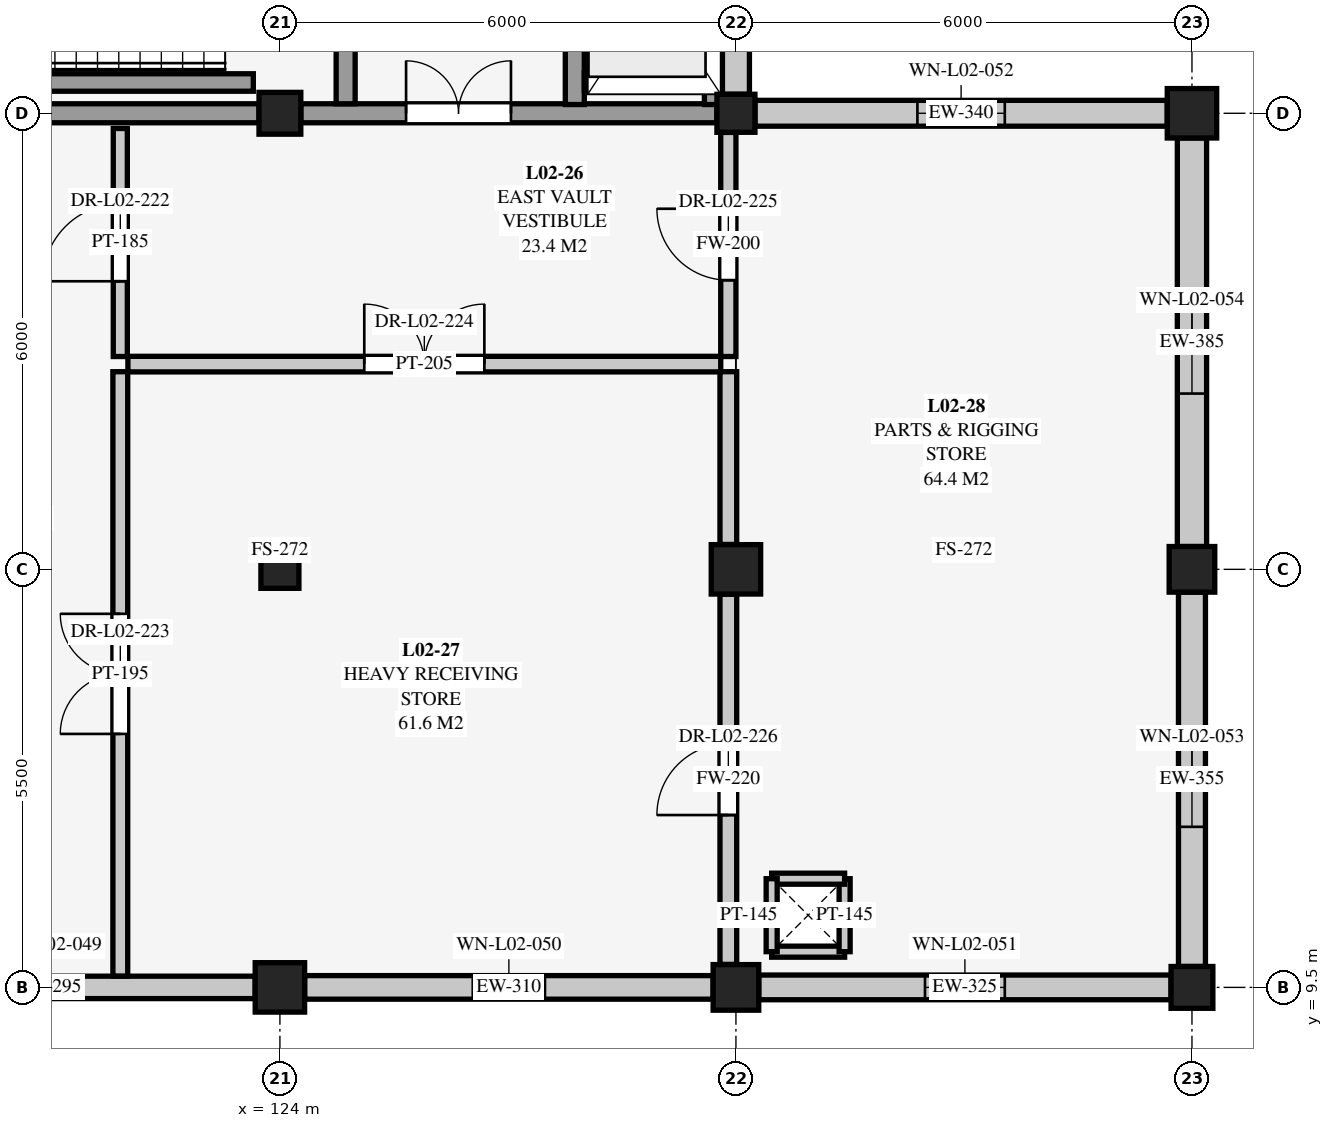
"""IFC4 building model, lengths in metres.
Left out: names, types, materials, properties, quantities, classifications, styles, units other than length and angle.
Written with IfcOpenShell. Run it as: python <this file> out.ifc"""

import sys

from ifc_helpers import new_model, si_unit, direction, frame, frame_2d, origin, origin_2d, place, context, subcontext, project, spatial, rectangle, extrude, element, fill, save


model = new_model("IFC4")
c1 = context("Model", 3, precision=1e-05, world=origin(), true_north=direction((0.0, 1.0)))
c2 = subcontext(c1, "Body", "Model", "MODEL_VIEW")
j1 = project(units=[si_unit("LENGTHUNIT", "METRE"), si_unit("PLANEANGLEUNIT", "RADIAN")], contexts=[c1])
p1 = place(None, origin())
s1 = spatial("IfcSite", under=j1, at=p1, CompositionType="ELEMENT")
p2 = place(p1, origin())
s2 = spatial("IfcBuilding", under=s1, at=p2, CompositionType="ELEMENT")
p3 = place(p2, frame((0.0, 0.0, 4.5)))
s3 = spatial("IfcBuildingStorey", under=s2, at=p3, CompositionType="ELEMENT", Elevation=4.5)
p4 = place(p3, frame((124.0, 9.5, 0.0), z_axis=(0.0, 0.0, 1.0), x_axis=(1.0, 0.0, 0.0)))
e1 = element("IfcColumn", 1, at=p4, inside=s3, PredefinedType="COLUMN", context=c2, shape_type="SweptSolid", body=[
    extrude(rectangle(XDim=0.65, YDim=0.65, at=origin_2d()), origin(), (0.0, 0.0, 1.0), 4.5),
])
p5 = place(p3, frame((124.0, 15.0, 0.0), z_axis=(0.0, 0.0, 1.0), x_axis=(1.0, 0.0, 0.0)))
e2 = element("IfcColumn", 2, at=p5, inside=s3, PredefinedType="COLUMN", context=c2, shape_type="SweptSolid", body=[
    extrude(rectangle(XDim=0.5, YDim=0.5, at=origin_2d()), origin(), (0.0, 0.0, 1.0), 4.5),
])
p6 = place(p3, frame((124.0, 21.0, 0.0), z_axis=(0.0, 0.0, 1.0), x_axis=(1.0, 0.0, 0.0)))
e3 = element("IfcColumn", 3, at=p6, inside=s3, PredefinedType="COLUMN", context=c2, shape_type="SweptSolid", body=[
    extrude(rectangle(XDim=0.55, YDim=0.55, at=origin_2d()), origin(), (0.0, 0.0, 1.0), 4.5),
])
p7 = place(p3, frame((130.0, 9.5, 0.0), z_axis=(0.0, 0.0, 1.0), x_axis=(1.0, 0.0, 0.0)))
e4 = element("IfcColumn", 4, at=p7, inside=s3, PredefinedType="COLUMN", context=c2, shape_type="SweptSolid", body=[
    extrude(rectangle(XDim=0.6, YDim=0.6, at=origin_2d()), origin(), (0.0, 0.0, 1.0), 4.5),
])
p8 = place(p3, frame((130.0, 15.0, 0.0), z_axis=(0.0, 0.0, 1.0), x_axis=(1.0, 0.0, 0.0)))
e5 = element("IfcColumn", 5, at=p8, inside=s3, PredefinedType="COLUMN", context=c2, shape_type="SweptSolid", body=[
    extrude(rectangle(XDim=0.65, YDim=0.65, at=origin_2d()), origin(), (0.0, 0.0, 1.0), 4.5),
])
p9 = place(p3, frame((130.0, 21.0, 0.0), z_axis=(0.0, 0.0, 1.0), x_axis=(1.0, 0.0, 0.0)))
e6 = element("IfcColumn", 6, at=p9, inside=s3, PredefinedType="COLUMN", context=c2, shape_type="SweptSolid", body=[
    extrude(rectangle(XDim=0.5, YDim=0.5, at=origin_2d()), origin(), (0.0, 0.0, 1.0), 4.5),
])
p10 = place(p3, frame((136.0, 9.5, 0.0), z_axis=(0.0, 0.0, 1.0), x_axis=(1.0, 0.0, 0.0)))
e7 = element("IfcColumn", 7, at=p10, inside=s3, PredefinedType="COLUMN", context=c2, shape_type="SweptSolid", body=[
    extrude(rectangle(XDim=0.55, YDim=0.55, at=origin_2d()), origin(), (0.0, 0.0, 1.0), 4.5),
])
p11 = place(p3, frame((136.0, 15.0, 0.0), z_axis=(0.0, 0.0, 1.0), x_axis=(1.0, 0.0, 0.0)))
e8 = element("IfcColumn", 8, at=p11, inside=s3, PredefinedType="COLUMN", context=c2, shape_type="SweptSolid", body=[
    extrude(rectangle(XDim=0.6, YDim=0.6, at=origin_2d()), origin(), (0.0, 0.0, 1.0), 4.5),
])
p12 = place(p3, frame((136.0, 21.0, 0.0), z_axis=(0.0, 0.0, 1.0), x_axis=(1.0, 0.0, 0.0)))
e9 = element("IfcColumn", 9, at=p12, inside=s3, PredefinedType="COLUMN", context=c2, shape_type="SweptSolid", body=[
    extrude(rectangle(XDim=0.65, YDim=0.65, at=origin_2d()), origin(), (0.0, 0.0, 1.0), 4.5),
])
p13 = place(p3, frame((123.675, 9.5, 0.0), z_axis=(0.0, 0.0, 1.0), x_axis=(-1.0, 0.0, 0.0)))
e10 = element("IfcWall", 10, at=p13, inside=s3, PredefinedType="SOLIDWALL", context=c2, shape_type="SweptSolid", body=[
    extrude(rectangle(XDim=5.425, YDim=0.295, at=frame_2d((2.712, 0.0))), origin(), (0.0, 0.0, 1.0), 3.809),
])
p14 = place(p13, frame((2.288, 0.0, 0.9)))
e11 = element("IfcOpeningElement", 11, at=p14, cuts=e10, PredefinedType="OPENING", context=c2, shape_type="SweptSolid", body=[
    extrude(rectangle(XDim=0.85, YDim=1.95, at=frame_2d((0.425, 0.975))), frame((0.0, 0.157, 0.0), z_axis=(0.0, -1.0, 0.0), x_axis=(1.0, 0.0, 0.0)), (0.0, 0.0, 1.0), 0.315),
])
p15 = place(p3, frame((129.7, 9.5, 0.0), z_axis=(0.0, 0.0, 1.0), x_axis=(-1.0, 0.0, 0.0)))
e12 = element("IfcWall", 12, at=p15, inside=s3, PredefinedType="SOLIDWALL", context=c2, shape_type="SweptSolid", body=[
    extrude(rectangle(XDim=5.375, YDim=0.31, at=frame_2d((2.688, 0.0))), origin(), (0.0, 0.0, 1.0), 3.809),
])
p16 = place(p15, frame((2.212, 0.0, 0.9)))
e13 = element("IfcOpeningElement", 13, at=p16, cuts=e12, PredefinedType="OPENING", context=c2, shape_type="SweptSolid", body=[
    extrude(rectangle(XDim=0.95, YDim=1.95, at=frame_2d((0.475, 0.975))), frame((0.0, 0.165, 0.0), z_axis=(0.0, -1.0, 0.0), x_axis=(1.0, 0.0, 0.0)), (0.0, 0.0, 1.0), 0.33),
])
p17 = place(p3, frame((135.725, 9.5, 0.0), z_axis=(0.0, 0.0, 1.0), x_axis=(-1.0, 0.0, 0.0)))
e14 = element("IfcWall", 14, at=p17, inside=s3, PredefinedType="SOLIDWALL", context=c2, shape_type="SweptSolid", body=[
    extrude(rectangle(XDim=5.425, YDim=0.325, at=frame_2d((2.712, 0.0))), origin(), (0.0, 0.0, 1.0), 3.809),
])
p18 = place(p17, frame((2.188, 0.0, 0.85)))
e15 = element("IfcOpeningElement", 15, at=p18, cuts=e14, PredefinedType="OPENING", context=c2, shape_type="SweptSolid", body=[
    extrude(rectangle(XDim=1.05, YDim=2.05, at=frame_2d((0.525, 1.025))), frame((0.0, 0.173, 0.0), z_axis=(0.0, -1.0, 0.0), x_axis=(1.0, 0.0, 0.0)), (0.0, 0.0, 1.0), 0.345),
])
p19 = place(p3, frame((130.25, 21.0, 0.0), z_axis=(0.0, 0.0, 1.0), x_axis=(1.0, 0.0, 0.0)))
e16 = element("IfcWall", 16, at=p19, inside=s3, PredefinedType="SOLIDWALL", context=c2, shape_type="SweptSolid", body=[
    extrude(rectangle(XDim=5.425, YDim=0.34, at=frame_2d((2.712, 0.0))), origin(), (0.0, 0.0, 1.0), 3.797),
])
p20 = place(p19, frame((2.137, 0.0, 0.85)))
e17 = element("IfcOpeningElement", 17, at=p20, cuts=e16, PredefinedType="OPENING", context=c2, shape_type="SweptSolid", body=[
    extrude(rectangle(XDim=1.15, YDim=2.05, at=frame_2d((0.575, 1.025))), frame((0.0, 0.18, 0.0), z_axis=(0.0, -1.0, 0.0), x_axis=(1.0, 0.0, 0.0)), (0.0, 0.0, 1.0), 0.36),
])
p21 = place(p3, frame((136.0, 14.7, 0.0), z_axis=(0.0, 0.0, 1.0), x_axis=(0.0, -1.0, 0.0)))
e18 = element("IfcWall", 18, at=p21, inside=s3, PredefinedType="SOLIDWALL", context=c2, shape_type="SweptSolid", body=[
    extrude(rectangle(XDim=4.925, YDim=0.355, at=frame_2d((2.462, 0.0))), origin(), (0.0, 0.0, 1.0), 3.809),
])
p22 = place(p21, frame((1.837, 0.0, 0.8)))
e19 = element("IfcOpeningElement", 19, at=p22, cuts=e18, PredefinedType="OPENING", context=c2, shape_type="SweptSolid", body=[
    extrude(rectangle(XDim=1.25, YDim=2.15, at=frame_2d((0.625, 1.075))), frame((0.0, 0.188, 0.0), z_axis=(0.0, -1.0, 0.0), x_axis=(1.0, 0.0, 0.0)), (0.0, 0.0, 1.0), 0.375),
])
p23 = place(p3, frame((136.0, 20.675, 0.0), z_axis=(0.0, 0.0, 1.0), x_axis=(0.0, -1.0, 0.0)))
e20 = element("IfcWall", 20, at=p23, inside=s3, PredefinedType="SOLIDWALL", context=c2, shape_type="SweptSolid", body=[
    extrude(rectangle(XDim=5.375, YDim=0.385, at=frame_2d((2.688, 0.0))), origin(), (0.0, 0.0, 1.0), 3.809),
])
p24 = place(p23, frame((2.012, 0.0, 0.8)))
e21 = element("IfcOpeningElement", 21, at=p24, cuts=e20, PredefinedType="OPENING", context=c2, shape_type="SweptSolid", body=[
    extrude(rectangle(XDim=1.35, YDim=2.15, at=frame_2d((0.675, 1.075))), frame((0.0, 0.202, 0.0), z_axis=(0.0, -1.0, 0.0), x_axis=(1.0, 0.0, 0.0)), (0.0, 0.0, 1.0), 0.405),
])
p25 = place(p3, frame((130.0, 26.75, 0.0), z_axis=(0.0, 0.0, 1.0), x_axis=(0.0, -1.0, 0.0)))
e22 = element("IfcWall", 22, at=p25, inside=s3, PredefinedType="SOLIDWALL", context=c2, shape_type="SweptSolid", body=[
    extrude(rectangle(XDim=5.5, YDim=0.355, at=frame_2d((2.75, 0.0))), origin(), (0.0, 0.0, 1.0), 3.797),
])
for number, where, z_axis, x_axis in (
    (23, (130.47, 9.97, 0.0), (0.0, 0.0, 1.0), (1.0, 0.0, 0.0)),
    (24, (131.43, 9.97, 0.0), (0.0, 0.0, 1.0), (0.0, 1.0, 0.0)),
    (25, (131.43, 10.93, 0.0), (0.0, 0.0, 1.0), (-1.0, 0.0, 0.0)),
    (26, (130.47, 10.93, 0.0), (0.0, 0.0, 1.0), (0.0, -1.0, 0.0)),
):
    element("IfcWall", number, at=place(p3, frame(where, z_axis=z_axis, x_axis=x_axis)), inside=s3, PredefinedType="PARTITIONING", context=c2, shape_type="SweptSolid", body=[
        extrude(rectangle(XDim=0.96, YDim=0.145, at=frame_2d((0.48, 0.0))), origin(), (0.0, 0.0, 1.0), 4.216),
    ])
p26 = place(p3, frame((118.3, 21.0, 0.0), z_axis=(0.0, 0.0, 1.0), x_axis=(1.0, 0.0, 0.0)))
e27 = element("IfcWall", 27, at=p26, inside=s3, PredefinedType="SHEAR", context=c2, shape_type="SweptSolid", body=[
    extrude(rectangle(XDim=5.425, YDim=0.25, at=frame_2d((2.712, 0.0))), origin(), (0.0, 0.0, 1.0), 4.204),
])
p27 = place(p3, frame((124.275, 21.0, 0.0), z_axis=(0.0, 0.0, 1.0), x_axis=(1.0, 0.0, 0.0)))
e28 = element("IfcWall", 28, at=p27, inside=s3, PredefinedType="SHEAR", context=c2, shape_type="SweptSolid", body=[
    extrude(rectangle(XDim=5.475, YDim=0.25, at=frame_2d((2.738, 0.0))), origin(), (0.0, 0.0, 1.0), 4.204),
])
p28 = place(p27, frame((1.385, 0.0, 0.0)))
e29 = element("IfcOpeningElement", 29, at=p28, cuts=e28, PredefinedType="OPENING", context=c2, shape_type="SweptSolid", body=[
    extrude(rectangle(XDim=1.38, YDim=2.16, at=frame_2d((0.69, 1.08))), frame((0.0, 0.135, 0.0), z_axis=(0.0, -1.0, 0.0), x_axis=(1.0, 0.0, 0.0)), (0.0, 0.0, 1.0), 0.27),
])
p29 = place(p3, frame((118.52, 21.405, 0.0), z_axis=(0.0, 0.0, 1.0), x_axis=(1.0, 0.0, 0.0)))
e30 = element("IfcWall", 30, at=p29, inside=s3, PredefinedType="SHEAR", context=c2, shape_type="SweptSolid", body=[
    extrude(rectangle(XDim=5.13, YDim=0.23, at=frame_2d((2.565, 0.0))), origin(), (0.0, 0.0, 1.0), 4.5),
])
p30 = place(p3, frame((124.865, 21.125, 0.0), z_axis=(0.0, 0.0, 1.0), x_axis=(0.0, 1.0, 0.0)))
e31 = element("IfcWall", 31, at=p30, inside=s3, PredefinedType="SHEAR", context=c2, shape_type="SweptSolid", body=[
    extrude(rectangle(XDim=5.75, YDim=0.25, at=frame_2d((2.875, 0.0))), origin(), (0.0, 0.0, 1.0), 4.204),
])
p31 = place(p30, frame((4.275, 0.0, 0.0)))
e32 = element("IfcOpeningElement", 32, at=p31, cuts=e31, PredefinedType="OPENING", context=c2, shape_type="SweptSolid", body=[
    extrude(rectangle(XDim=1.04, YDim=2.14, at=frame_2d((0.52, 1.07))), frame((0.0, 0.135, 0.0), z_axis=(0.0, -1.0, 0.0), x_axis=(1.0, 0.0, 0.0)), (0.0, 0.0, 1.0), 0.27),
])
p32 = place(p3, frame((127.88, 21.115, 0.0), z_axis=(0.0, 0.0, 1.0), x_axis=(0.0, 1.0, 0.0)))
e33 = element("IfcWall", 33, at=p32, inside=s3, PredefinedType="SHEAR", context=c2, shape_type="SweptSolid", body=[
    extrude(rectangle(XDim=2.965, YDim=0.25, at=frame_2d((1.482, 0.0))), origin(), (0.0, 0.0, 1.0), 4.5),
])
p33 = place(p32, frame((1.095, 0.0, 0.0)))
e34 = element("IfcOpeningElement", 34, at=p33, cuts=e33, PredefinedType="OPENING", context=c2, shape_type="SweptSolid", body=[
    extrude(rectangle(XDim=1.08, YDim=2.15, at=frame_2d((0.54, 1.075))), frame((0.0, 0.135, 0.0), z_axis=(0.0, -1.0, 0.0), x_axis=(1.0, 0.0, 0.0)), (0.0, 0.0, 1.0), 0.27),
])
p34 = place(p3, frame((128.005, 21.42, 0.0), z_axis=(0.0, 0.0, 1.0), x_axis=(1.0, 0.0, 0.0)))
e35 = element("IfcWall", 35, at=p34, inside=s3, PredefinedType="SHEAR", context=c2, shape_type="SweptSolid", body=[
    extrude(rectangle(XDim=1.58, YDim=0.23, at=frame_2d((0.79, 0.0))), origin(), (0.0, 0.0, 1.0), 4.5),
])
p35 = place(p3, frame((129.7, 21.115, 0.0), z_axis=(0.0, 0.0, 1.0), x_axis=(0.0, 1.0, 0.0)))
e36 = element("IfcWall", 36, at=p35, inside=s3, PredefinedType="SHEAR", context=c2, shape_type="SweptSolid", body=[
    extrude(rectangle(XDim=2.965, YDim=0.23, at=frame_2d((1.482, 0.0))), origin(), (0.0, 0.0, 1.0), 4.5),
])
p36 = place(p3, frame((121.9, 17.8, 0.0), z_axis=(0.0, 0.0, 1.0), x_axis=(0.0, 1.0, 0.0)))
e37 = element("IfcWall", 37, at=p36, inside=s3, PredefinedType="PARTITIONING", context=c2, shape_type="SweptSolid", body=[
    extrude(rectangle(XDim=3.0, YDim=0.185, at=frame_2d((1.5, 0.0))), origin(), (0.0, 0.0, 1.0), 4.216),
])
p37 = place(p36, frame((0.99, 0.0, 0.0)))
e38 = element("IfcOpeningElement", 38, at=p37, cuts=e37, PredefinedType="OPENING", context=c2, shape_type="SweptSolid", body=[
    extrude(rectangle(XDim=1.02, YDim=2.16, at=frame_2d((0.51, 1.08))), frame((0.0, 0.103, 0.0), z_axis=(0.0, -1.0, 0.0), x_axis=(1.0, 0.0, 0.0)), (0.0, 0.0, 1.0), 0.205),
])
p38 = place(p3, frame((121.9, 9.649, 0.0), z_axis=(0.0, 0.0, 1.0), x_axis=(0.0, 1.0, 0.0)))
e39 = element("IfcWall", 39, at=p38, inside=s3, PredefinedType="PARTITIONING", context=c2, shape_type="SweptSolid", body=[
    extrude(rectangle(XDim=7.951, YDim=0.195, at=frame_2d((3.975, 0.0))), origin(), (0.0, 0.0, 1.0), 4.216),
])
p39 = place(p38, frame((3.185, 0.0, 0.0)))
e40 = element("IfcOpeningElement", 40, at=p39, cuts=e39, PredefinedType="OPENING", context=c2, shape_type="SweptSolid", body=[
    extrude(rectangle(XDim=1.58, YDim=2.2, at=frame_2d((0.79, 1.1))), frame((0.0, 0.108, 0.0), z_axis=(0.0, -1.0, 0.0), x_axis=(1.0, 0.0, 0.0)), (0.0, 0.0, 1.0), 0.215),
])
p40 = place(p3, frame((122.0, 17.7, 0.0), z_axis=(0.0, 0.0, 1.0), x_axis=(1.0, 0.0, 0.0)))
e41 = element("IfcWall", 41, at=p40, inside=s3, PredefinedType="PARTITIONING", context=c2, shape_type="SweptSolid", body=[
    extrude(rectangle(XDim=7.8, YDim=0.205, at=frame_2d((3.9, 0.0))), origin(), (0.0, 0.0, 1.0), 4.216),
])
p41 = place(p40, frame((3.11, 0.0, 0.0)))
e42 = element("IfcOpeningElement", 42, at=p41, cuts=e41, PredefinedType="OPENING", context=c2, shape_type="SweptSolid", body=[
    extrude(rectangle(XDim=1.58, YDim=2.2, at=frame_2d((0.79, 1.1))), frame((0.0, 0.113, 0.0), z_axis=(0.0, -1.0, 0.0), x_axis=(1.0, 0.0, 0.0)), (0.0, 0.0, 1.0), 0.225),
])
p42 = place(p3, frame((129.9, 17.8, 0.0), z_axis=(0.0, 0.0, 1.0), x_axis=(0.0, 1.0, 0.0)))
e43 = element("IfcWall", 43, at=p42, inside=s3, PredefinedType="SOLIDWALL", context=c2, shape_type="SweptSolid", body=[
    extrude(rectangle(XDim=2.948, YDim=0.2, at=frame_2d((1.474, 0.0))), origin(), (0.0, 0.0, 1.0), 3.85),
])
p43 = place(p42, frame((1.004, 0.0, 0.0)))
e44 = element("IfcOpeningElement", 44, at=p43, cuts=e43, PredefinedType="OPENING", context=c2, shape_type="SweptSolid", body=[
    extrude(rectangle(XDim=0.94, YDim=2.1, at=frame_2d((0.47, 1.05))), frame((0.0, 0.11, 0.0), z_axis=(0.0, -1.0, 0.0), x_axis=(1.0, 0.0, 0.0)), (0.0, 0.0, 1.0), 0.22),
])
p44 = place(p3, frame((129.9, 9.802, 0.0), z_axis=(0.0, 0.0, 1.0), x_axis=(0.0, 1.0, 0.0)))
e45 = element("IfcWall", 45, at=p44, inside=s3, PredefinedType="SOLIDWALL", context=c2, shape_type="SweptSolid", body=[
    extrude(rectangle(XDim=4.871, YDim=0.22, at=frame_2d((2.436, 0.0))), origin(), (0.0, 0.0, 1.0), 4.216),
])
p45 = place(p44, frame((1.966, 0.0, 0.0)))
e46 = element("IfcOpeningElement", 46, at=p45, cuts=e45, PredefinedType="OPENING", context=c2, shape_type="SweptSolid", body=[
    extrude(rectangle(XDim=0.94, YDim=2.1, at=frame_2d((0.47, 1.05))), frame((0.0, 0.12, 0.0), z_axis=(0.0, -1.0, 0.0), x_axis=(1.0, 0.0, 0.0)), (0.0, 0.0, 1.0), 0.24),
])
p46 = place(p3, frame((129.9, 15.327, 0.0), z_axis=(0.0, 0.0, 1.0), x_axis=(0.0, 1.0, 0.0)))
e47 = element("IfcWall", 47, at=p46, inside=s3, PredefinedType="SOLIDWALL", context=c2, shape_type="SweptSolid", body=[
    extrude(rectangle(XDim=2.273, YDim=0.22, at=frame_2d((1.137, 0.0))), origin(), (0.0, 0.0, 1.0), 3.85),
])
p47 = place(p14, origin())
e48 = element("IfcWindow", 48, at=p47, inside=s3, PartitioningType="SINGLE_PANEL", PredefinedType="WINDOW", context=c2, shape_type="SweptSolid", body=[
    extrude(rectangle(XDim=0.85, YDim=1.95, at=frame_2d((0.425, 0.975))), frame((0.0, 0.03, 0.0), z_axis=(0.0, -1.0, 0.0), x_axis=(1.0, 0.0, 0.0)), (0.0, 0.0, 1.0), 0.06),
])
fill(e11, e48)
p48 = place(p16, origin())
e49 = element("IfcWindow", 49, at=p48, inside=s3, PartitioningType="SINGLE_PANEL", PredefinedType="WINDOW", context=c2, shape_type="SweptSolid", body=[
    extrude(rectangle(XDim=0.95, YDim=1.95, at=frame_2d((0.475, 0.975))), frame((0.0, 0.03, 0.0), z_axis=(0.0, -1.0, 0.0), x_axis=(1.0, 0.0, 0.0)), (0.0, 0.0, 1.0), 0.06),
])
fill(e13, e49)
p49 = place(p18, origin())
e50 = element("IfcWindow", 50, at=p49, inside=s3, PartitioningType="SINGLE_PANEL", PredefinedType="WINDOW", context=c2, shape_type="SweptSolid", body=[
    extrude(rectangle(XDim=1.05, YDim=2.05, at=frame_2d((0.525, 1.025))), frame((0.0, 0.03, 0.0), z_axis=(0.0, -1.0, 0.0), x_axis=(1.0, 0.0, 0.0)), (0.0, 0.0, 1.0), 0.06),
])
fill(e15, e50)
p50 = place(p20, origin())
e51 = element("IfcWindow", 51, at=p50, inside=s3, PartitioningType="SINGLE_PANEL", PredefinedType="WINDOW", context=c2, shape_type="SweptSolid", body=[
    extrude(rectangle(XDim=1.15, YDim=2.05, at=frame_2d((0.575, 1.025))), frame((0.0, 0.03, 0.0), z_axis=(0.0, -1.0, 0.0), x_axis=(1.0, 0.0, 0.0)), (0.0, 0.0, 1.0), 0.06),
])
fill(e17, e51)
p51 = place(p22, origin())
e52 = element("IfcWindow", 52, at=p51, inside=s3, PartitioningType="SINGLE_PANEL", PredefinedType="WINDOW", context=c2, shape_type="SweptSolid", body=[
    extrude(rectangle(XDim=1.25, YDim=2.15, at=frame_2d((0.625, 1.075))), frame((0.0, 0.03, 0.0), z_axis=(0.0, -1.0, 0.0), x_axis=(1.0, 0.0, 0.0)), (0.0, 0.0, 1.0), 0.06),
])
fill(e19, e52)
p52 = place(p24, origin())
e53 = element("IfcWindow", 53, at=p52, inside=s3, PartitioningType="SINGLE_PANEL", PredefinedType="WINDOW", context=c2, shape_type="SweptSolid", body=[
    extrude(rectangle(XDim=1.35, YDim=2.15, at=frame_2d((0.675, 1.075))), frame((0.0, 0.03, 0.0), z_axis=(0.0, -1.0, 0.0), x_axis=(1.0, 0.0, 0.0)), (0.0, 0.0, 1.0), 0.06),
])
fill(e21, e53)
p53 = place(p28, origin())
e54 = element("IfcDoor", 54, at=p53, inside=s3, OperationType="DOUBLE_DOOR_SINGLE_SWING", PredefinedType="DOOR", context=c2, shape_type="SweptSolid", body=[
    extrude(rectangle(XDim=1.38, YDim=2.16, at=frame_2d((0.69, 1.08))), frame((0.0, 0.025, 0.0), z_axis=(0.0, -1.0, 0.0), x_axis=(1.0, 0.0, 0.0)), (0.0, 0.0, 1.0), 0.05),
])
fill(e29, e54)
p54 = place(p37, origin())
e55 = element("IfcDoor", 55, at=p54, inside=s3, OperationType="SINGLE_SWING_LEFT", PredefinedType="DOOR", context=c2, shape_type="SweptSolid", body=[
    extrude(rectangle(XDim=1.02, YDim=2.16, at=frame_2d((0.51, 1.08))), frame((0.0, 0.025, 0.0), z_axis=(0.0, -1.0, 0.0), x_axis=(1.0, 0.0, 0.0)), (0.0, 0.0, 1.0), 0.05),
])
fill(e38, e55)
p55 = place(p39, origin())
e56 = element("IfcDoor", 56, at=p55, inside=s3, OperationType="DOUBLE_DOOR_SINGLE_SWING", PredefinedType="DOOR", context=c2, shape_type="SweptSolid", body=[
    extrude(rectangle(XDim=1.58, YDim=2.2, at=frame_2d((0.79, 1.1))), frame((0.0, 0.025, 0.0), z_axis=(0.0, -1.0, 0.0), x_axis=(1.0, 0.0, 0.0)), (0.0, 0.0, 1.0), 0.05),
])
fill(e40, e56)
p56 = place(p41, origin())
e57 = element("IfcDoor", 57, at=p56, inside=s3, OperationType="DOUBLE_DOOR_SINGLE_SWING", PredefinedType="DOOR", context=c2, shape_type="SweptSolid", body=[
    extrude(rectangle(XDim=1.58, YDim=2.2, at=frame_2d((0.79, 1.1))), frame((0.0, 0.025, 0.0), z_axis=(0.0, -1.0, 0.0), x_axis=(1.0, 0.0, 0.0)), (0.0, 0.0, 1.0), 0.05),
])
fill(e42, e57)
p57 = place(p43, origin())
e58 = element("IfcDoor", 58, at=p57, inside=s3, OperationType="SINGLE_SWING_RIGHT", PredefinedType="DOOR", context=c2, shape_type="SweptSolid", body=[
    extrude(rectangle(XDim=0.94, YDim=2.1, at=frame_2d((0.47, 1.05))), frame((0.0, 0.025, 0.0), z_axis=(0.0, -1.0, 0.0), x_axis=(1.0, 0.0, 0.0)), (0.0, 0.0, 1.0), 0.05),
])
fill(e44, e58)
p58 = place(p45, origin())
e59 = element("IfcDoor", 59, at=p58, inside=s3, OperationType="SINGLE_SWING_LEFT", PredefinedType="DOOR", context=c2, shape_type="SweptSolid", body=[
    extrude(rectangle(XDim=0.94, YDim=2.1, at=frame_2d((0.47, 1.05))), frame((0.0, 0.025, 0.0), z_axis=(0.0, -1.0, 0.0), x_axis=(1.0, 0.0, 0.0)), (0.0, 0.0, 1.0), 0.05),
])
fill(e46, e59)
save(model, sys.argv[1])
